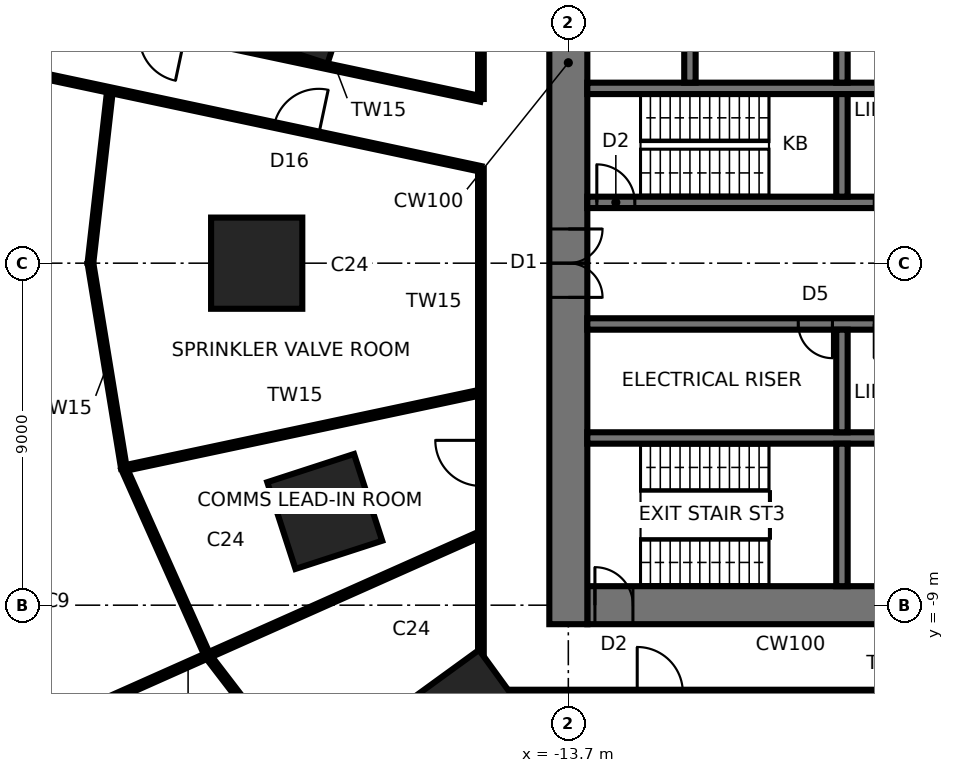
"""IFC4 building model, lengths in metres.
Left out: names, types, materials, properties, quantities, classifications, styles, units other than length and angle.
Written with IfcOpenShell. Run it as: python <this file> out.ifc"""

import sys

from ifc_helpers import new_model, si_unit, direction, frame, frame_2d, origin, origin_2d, place, context, subcontext, project, spatial, rectangle, extrude, element, fill, save


model = new_model("IFC4")
c1 = context("Model", 3, precision=1e-05, world=origin(), true_north=direction((0.0, 1.0)))
c2 = subcontext(c1, "Body", "Model", "MODEL_VIEW")
j1 = project(units=[si_unit("LENGTHUNIT", "METRE"), si_unit("PLANEANGLEUNIT", "RADIAN")], contexts=[c1])
p1 = place(None, origin())
s1 = spatial("IfcSite", under=j1, at=p1, CompositionType="ELEMENT")
p2 = place(p1, origin())
s2 = spatial("IfcBuilding", under=s1, at=p2, CompositionType="ELEMENT")
p3 = place(p2, frame((0.0, 0.0, -5.0)))
s3 = spatial("IfcBuildingStorey", under=s2, at=p3, CompositionType="ELEMENT", Elevation=-5.0)
for number, where, z_axis, x_axis in (
    (1, (-20.808, 6.761, -0.15), (0.0, 0.0, 1.0), (-0.951, 0.309, 0.0)),
    (2, (-21.9, 0.0, -0.15), (0.0, 0.0, 1.0), (-1.0, 0.0, 0.0)),
    (3, (-20.109, -6.534, -0.15), (0.0, 0.0, 1.0), (-0.951, -0.309, 0.0)),
    (4, (-16.315, -11.854, -0.15), (0.0, 0.0, 1.0), (-0.809, -0.588, 0.0)),
):
    element("IfcColumn", number, at=place(p3, frame(where, z_axis=z_axis, x_axis=x_axis)), inside=s3, PredefinedType="COLUMN", context=c2, shape_type="SweptSolid", body=[
        extrude(rectangle(XDim=2.4, YDim=2.4, at=origin_2d()), origin(), (0.0, 0.0, 1.0), 5.15),
    ])
p4 = place(p3, frame((-13.2, -9.0, -0.15), z_axis=(0.0, 0.0, 1.0), x_axis=(1.0, 0.0, 0.0)))
e5 = element("IfcWall", 5, at=p4, inside=s3, PredefinedType="SHEAR", context=c2, shape_type="SweptSolid", body=[
    extrude(rectangle(XDim=26.4, YDim=1.0, at=frame_2d((13.2, 0.0))), origin(), (0.0, 0.0, 1.0), 5.15),
])
p5 = place(p4, frame((0.2, 0.0, 0.15)))
e6 = element("IfcOpeningElement", 6, at=p5, cuts=e5, PredefinedType="OPENING", context=c2, shape_type="SweptSolid", body=[
    extrude(rectangle(XDim=1.0, YDim=2.1, at=frame_2d((0.5, 1.05))), frame((0.0, 0.51, 0.0), z_axis=(0.0, -1.0, 0.0), x_axis=(1.0, 0.0, 0.0)), (0.0, 0.0, 1.0), 1.02),
])
p6 = place(p4, frame((9.5, 0.0, 0.15)))
e7 = element("IfcOpeningElement", 7, at=p6, cuts=e5, PredefinedType="OPENING", context=c2, shape_type="SweptSolid", body=[
    extrude(rectangle(XDim=0.9, YDim=2.1, at=frame_2d((0.45, 1.05))), frame((0.0, 0.51, 0.0), z_axis=(0.0, -1.0, 0.0), x_axis=(1.0, 0.0, 0.0)), (0.0, 0.0, 1.0), 1.02),
])
p7 = place(p4, frame((16.0, 0.0, 0.15)))
e8 = element("IfcOpeningElement", 8, at=p7, cuts=e5, PredefinedType="OPENING", context=c2, shape_type="SweptSolid", body=[
    extrude(rectangle(XDim=0.9, YDim=2.1, at=frame_2d((0.45, 1.05))), frame((0.0, 0.51, 0.0), z_axis=(0.0, -1.0, 0.0), x_axis=(1.0, 0.0, 0.0)), (0.0, 0.0, 1.0), 1.02),
])
p8 = place(p4, frame((22.85, 0.0, 0.15)))
e9 = element("IfcOpeningElement", 9, at=p8, cuts=e5, PredefinedType="OPENING", context=c2, shape_type="SweptSolid", body=[
    extrude(rectangle(XDim=0.9, YDim=2.1, at=frame_2d((0.45, 1.05))), frame((0.0, 0.51, 0.0), z_axis=(0.0, -1.0, 0.0), x_axis=(1.0, 0.0, 0.0)), (0.0, 0.0, 1.0), 1.02),
])
p9 = place(p3, frame((-13.7, 9.5, -0.15), z_axis=(0.0, 0.0, 1.0), x_axis=(0.0, -1.0, 0.0)))
e10 = element("IfcWall", 10, at=p9, inside=s3, PredefinedType="SHEAR", context=c2, shape_type="SweptSolid", body=[
    extrude(rectangle(XDim=19.0, YDim=1.0, at=frame_2d((9.5, 0.0))), origin(), (0.0, 0.0, 1.0), 5.15),
])
p10 = place(p9, frame((8.6, 0.0, 0.15)))
e11 = element("IfcOpeningElement", 11, at=p10, cuts=e10, PredefinedType="OPENING", context=c2, shape_type="SweptSolid", body=[
    extrude(rectangle(XDim=1.8, YDim=2.4, at=frame_2d((0.9, 1.2))), frame((0.0, 0.51, 0.0), z_axis=(0.0, -1.0, 0.0), x_axis=(1.0, 0.0, 0.0)), (0.0, 0.0, 1.0), 1.02),
])
p11 = place(p3, frame((-13.2, 1.6, -0.15), z_axis=(0.0, 0.0, 1.0), x_axis=(1.0, 0.0, 0.0)))
e12 = element("IfcWall", 12, at=p11, inside=s3, PredefinedType="SHEAR", context=c2, shape_type="SweptSolid", body=[
    extrude(rectangle(XDim=26.4, YDim=0.3, at=frame_2d((13.2, 0.0))), origin(), (0.0, 0.0, 1.0), 5.15),
])
p12 = place(p11, frame((0.25, 0.0, 0.15)))
e13 = element("IfcOpeningElement", 13, at=p12, cuts=e12, PredefinedType="OPENING", context=c2, shape_type="SweptSolid", body=[
    extrude(rectangle(XDim=1.0, YDim=2.1, at=frame_2d((0.5, 1.05))), frame((0.0, 0.16, 0.0), z_axis=(0.0, -1.0, 0.0), x_axis=(1.0, 0.0, 0.0)), (0.0, 0.0, 1.0), 0.32),
])
p13 = place(p11, frame((20.25, 0.0, 0.15)))
e14 = element("IfcOpeningElement", 14, at=p13, cuts=e12, PredefinedType="OPENING", context=c2, shape_type="SweptSolid", body=[
    extrude(rectangle(XDim=1.5, YDim=2.4, at=frame_2d((0.75, 1.2))), frame((0.0, 0.16, 0.0), z_axis=(0.0, -1.0, 0.0), x_axis=(1.0, 0.0, 0.0)), (0.0, 0.0, 1.0), 0.32),
])
p14 = place(p11, frame((7.55, 0.0, 0.15)))
e15 = element("IfcOpeningElement", 15, at=p14, cuts=e12, PredefinedType="OPENING", context=c2, shape_type="SweptSolid", body=[
    extrude(rectangle(XDim=0.9, YDim=2.1, at=frame_2d((0.45, 1.05))), frame((0.0, 0.16, 0.0), z_axis=(0.0, -1.0, 0.0), x_axis=(1.0, 0.0, 0.0)), (0.0, 0.0, 1.0), 0.32),
])
p15 = place(p11, frame((10.15, 0.0, 0.15)))
e16 = element("IfcOpeningElement", 16, at=p15, cuts=e12, PredefinedType="OPENING", context=c2, shape_type="SweptSolid", body=[
    extrude(rectangle(XDim=0.9, YDim=2.1, at=frame_2d((0.45, 1.05))), frame((0.0, 0.16, 0.0), z_axis=(0.0, -1.0, 0.0), x_axis=(1.0, 0.0, 0.0)), (0.0, 0.0, 1.0), 0.32),
])
p16 = place(p11, frame((12.75, 0.0, 0.15)))
e17 = element("IfcOpeningElement", 17, at=p16, cuts=e12, PredefinedType="OPENING", context=c2, shape_type="SweptSolid", body=[
    extrude(rectangle(XDim=0.9, YDim=2.1, at=frame_2d((0.45, 1.05))), frame((0.0, 0.16, 0.0), z_axis=(0.0, -1.0, 0.0), x_axis=(1.0, 0.0, 0.0)), (0.0, 0.0, 1.0), 0.32),
])
p17 = place(p11, frame((15.35, 0.0, 0.15)))
e18 = element("IfcOpeningElement", 18, at=p17, cuts=e12, PredefinedType="OPENING", context=c2, shape_type="SweptSolid", body=[
    extrude(rectangle(XDim=0.9, YDim=2.1, at=frame_2d((0.45, 1.05))), frame((0.0, 0.16, 0.0), z_axis=(0.0, -1.0, 0.0), x_axis=(1.0, 0.0, 0.0)), (0.0, 0.0, 1.0), 0.32),
])
p18 = place(p11, frame((17.95, 0.0, 0.15)))
e19 = element("IfcOpeningElement", 19, at=p18, cuts=e12, PredefinedType="OPENING", context=c2, shape_type="SweptSolid", body=[
    extrude(rectangle(XDim=0.9, YDim=2.1, at=frame_2d((0.45, 1.05))), frame((0.0, 0.16, 0.0), z_axis=(0.0, -1.0, 0.0), x_axis=(1.0, 0.0, 0.0)), (0.0, 0.0, 1.0), 0.32),
])
p19 = place(p11, frame((24.15, 0.0, 0.15)))
e20 = element("IfcOpeningElement", 20, at=p19, cuts=e12, PredefinedType="OPENING", context=c2, shape_type="SweptSolid", body=[
    extrude(rectangle(XDim=0.9, YDim=2.1, at=frame_2d((0.45, 1.05))), frame((0.0, 0.16, 0.0), z_axis=(0.0, -1.0, 0.0), x_axis=(1.0, 0.0, 0.0)), (0.0, 0.0, 1.0), 0.32),
])
p20 = place(p3, frame((-13.2, -1.6, -0.15), z_axis=(0.0, 0.0, 1.0), x_axis=(1.0, 0.0, 0.0)))
e21 = element("IfcWall", 21, at=p20, inside=s3, PredefinedType="SHEAR", context=c2, shape_type="SweptSolid", body=[
    extrude(rectangle(XDim=26.4, YDim=0.3, at=frame_2d((13.2, 0.0))), origin(), (0.0, 0.0, 1.0), 5.15),
])
p21 = place(p20, frame((25.15, 0.0, 0.15)))
e22 = element("IfcOpeningElement", 22, at=p21, cuts=e21, PredefinedType="OPENING", context=c2, shape_type="SweptSolid", body=[
    extrude(rectangle(XDim=1.0, YDim=2.1, at=frame_2d((0.5, 1.05))), frame((0.0, 0.16, 0.0), z_axis=(0.0, -1.0, 0.0), x_axis=(1.0, 0.0, 0.0)), (0.0, 0.0, 1.0), 0.32),
])
p22 = place(p20, frame((7.55, 0.0, 0.15)))
e23 = element("IfcOpeningElement", 23, at=p22, cuts=e21, PredefinedType="OPENING", context=c2, shape_type="SweptSolid", body=[
    extrude(rectangle(XDim=0.9, YDim=2.1, at=frame_2d((0.45, 1.05))), frame((0.0, 0.16, 0.0), z_axis=(0.0, -1.0, 0.0), x_axis=(1.0, 0.0, 0.0)), (0.0, 0.0, 1.0), 0.32),
])
p23 = place(p20, frame((10.15, 0.0, 0.15)))
e24 = element("IfcOpeningElement", 24, at=p23, cuts=e21, PredefinedType="OPENING", context=c2, shape_type="SweptSolid", body=[
    extrude(rectangle(XDim=0.9, YDim=2.1, at=frame_2d((0.45, 1.05))), frame((0.0, 0.16, 0.0), z_axis=(0.0, -1.0, 0.0), x_axis=(1.0, 0.0, 0.0)), (0.0, 0.0, 1.0), 0.32),
])
p24 = place(p20, frame((12.75, 0.0, 0.15)))
e25 = element("IfcOpeningElement", 25, at=p24, cuts=e21, PredefinedType="OPENING", context=c2, shape_type="SweptSolid", body=[
    extrude(rectangle(XDim=0.9, YDim=2.1, at=frame_2d((0.45, 1.05))), frame((0.0, 0.16, 0.0), z_axis=(0.0, -1.0, 0.0), x_axis=(1.0, 0.0, 0.0)), (0.0, 0.0, 1.0), 0.32),
])
p25 = place(p20, frame((15.25, 0.0, 0.15)))
e26 = element("IfcOpeningElement", 26, at=p25, cuts=e21, PredefinedType="OPENING", context=c2, shape_type="SweptSolid", body=[
    extrude(rectangle(XDim=1.1, YDim=2.3, at=frame_2d((0.55, 1.15))), frame((0.0, 0.16, 0.0), z_axis=(0.0, -1.0, 0.0), x_axis=(1.0, 0.0, 0.0)), (0.0, 0.0, 1.0), 0.32),
])
p26 = place(p20, frame((17.85, 0.0, 0.15)))
e27 = element("IfcOpeningElement", 27, at=p26, cuts=e21, PredefinedType="OPENING", context=c2, shape_type="SweptSolid", body=[
    extrude(rectangle(XDim=1.1, YDim=2.3, at=frame_2d((0.55, 1.15))), frame((0.0, 0.16, 0.0), z_axis=(0.0, -1.0, 0.0), x_axis=(1.0, 0.0, 0.0)), (0.0, 0.0, 1.0), 0.32),
])
p27 = place(p20, frame((5.55, 0.0, 0.15)))
e28 = element("IfcOpeningElement", 28, at=p27, cuts=e21, PredefinedType="OPENING", context=c2, shape_type="SweptSolid", body=[
    extrude(rectangle(XDim=0.9, YDim=2.1, at=frame_2d((0.45, 1.05))), frame((0.0, 0.16, 0.0), z_axis=(0.0, -1.0, 0.0), x_axis=(1.0, 0.0, 0.0)), (0.0, 0.0, 1.0), 0.32),
])
for number, where, z_axis, x_axis in (
    (29, (-13.2, 4.6, -0.15), (0.0, 0.0, 1.0), (1.0, 0.0, 0.0)),
    (30, (-13.2, -4.6, -0.15), (0.0, 0.0, 1.0), (1.0, 0.0, 0.0)),
):
    element("IfcWall", number, at=place(p3, frame(where, z_axis=z_axis, x_axis=x_axis)), inside=s3, PredefinedType="SHEAR", context=c2, shape_type="SweptSolid", body=[
        extrude(rectangle(XDim=26.4, YDim=0.3, at=frame_2d((13.2, 0.0))), origin(), (0.0, 0.0, 1.0), 5.15),
    ])
p28 = place(p3, frame((-6.5, 1.75, -0.15), z_axis=(0.0, 0.0, 1.0), x_axis=(0.0, 1.0, 0.0)))
e31 = element("IfcWall", 31, at=p28, inside=s3, PredefinedType="SHEAR", context=c2, shape_type="SweptSolid", body=[
    extrude(rectangle(XDim=2.7, YDim=0.3, at=frame_2d((1.35, 0.0))), origin(), (0.0, 0.0, 1.0), 5.15),
])
p29 = place(p3, frame((-6.5, 4.75, -0.15), z_axis=(0.0, 0.0, 1.0), x_axis=(0.0, 1.0, 0.0)))
e32 = element("IfcWall", 32, at=p29, inside=s3, PredefinedType="SHEAR", context=c2, shape_type="SweptSolid", body=[
    extrude(rectangle(XDim=3.75, YDim=0.3, at=frame_2d((1.875, 0.0))), origin(), (0.0, 0.0, 1.0), 5.15),
])
p30 = place(p3, frame((-6.5, -1.75, -0.15), z_axis=(0.0, 0.0, 1.0), x_axis=(0.0, -1.0, 0.0)))
e33 = element("IfcWall", 33, at=p30, inside=s3, PredefinedType="SHEAR", context=c2, shape_type="SweptSolid", body=[
    extrude(rectangle(XDim=2.7, YDim=0.3, at=frame_2d((1.35, 0.0))), origin(), (0.0, 0.0, 1.0), 5.15),
])
for number, where, z_axis, x_axis in (
    (34, (-6.5, -4.75, -0.15), (0.0, 0.0, 1.0), (0.0, -1.0, 0.0)),
    (35, (-10.5, 4.75, -0.15), (0.0, 0.0, 1.0), (0.0, 1.0, 0.0)),
):
    element("IfcWall", number, at=place(p3, frame(where, z_axis=z_axis, x_axis=x_axis)), inside=s3, PredefinedType="SHEAR", context=c2, shape_type="SweptSolid", body=[
        extrude(rectangle(XDim=3.75, YDim=0.3, at=frame_2d((1.875, 0.0))), origin(), (0.0, 0.0, 1.0), 5.15),
    ])
p31 = place(p3, frame((-25.393, -5.397, 0.0), z_axis=(0.0, 0.0, 1.0), x_axis=(-0.161241932964, 0.986914909733, 0.0)))
e36 = element("IfcWall", 36, at=p31, inside=s3, PredefinedType="PARTITIONING", context=c2, shape_type="SweptSolid", body=[
    extrude(rectangle(XDim=5.469, YDim=0.15, at=frame_2d((2.734, 0.0))), origin(), (0.0, 0.0, 1.0), 4.8),
])
p32 = place(p3, frame((-16.0, -3.401, 0.0), z_axis=(0.0, 0.0, 1.0), x_axis=(-0.978147089661, -0.207914095214, 0.0)))
e37 = element("IfcWall", 37, at=p32, inside=s3, PredefinedType="PARTITIONING", context=c2, shape_type="SweptSolid", body=[
    extrude(rectangle(XDim=9.603, YDim=0.15, at=frame_2d((4.802, 0.0))), origin(), (0.0, 0.0, 1.0), 4.8),
])
p33 = place(p3, frame((-16.0, 2.481, 0.0), z_axis=(0.0, 0.0, 1.0), x_axis=(0.0, -1.0, 0.0)))
e38 = element("IfcWall", 38, at=p33, inside=s3, PredefinedType="PARTITIONING", context=c2, shape_type="SweptSolid", body=[
    extrude(rectangle(XDim=13.781, YDim=0.15, at=frame_2d((6.89, 0.0))), origin(), (0.0, 0.0, 1.0), 4.8),
])
p34 = place(p33, frame((7.143, 0.0, 0.0)))
e39 = element("IfcOpeningElement", 39, at=p34, cuts=e38, PredefinedType="OPENING", context=c2, shape_type="SweptSolid", body=[
    extrude(rectangle(XDim=1.2, YDim=2.1, at=frame_2d((0.6, 1.05))), frame((0.0, 0.085, 0.0), z_axis=(0.0, -1.0, 0.0), x_axis=(1.0, 0.0, 0.0)), (0.0, 0.0, 1.0), 0.17),
])
p35 = place(p3, frame((-23.193, -10.326, 0.0), z_axis=(0.0, 0.0, 1.0), x_axis=(-0.40763198254, 0.91314630088, 0.0)))
e40 = element("IfcWall", 40, at=p35, inside=s3, PredefinedType="PARTITIONING", context=c2, shape_type="SweptSolid", body=[
    extrude(rectangle(XDim=5.397, YDim=0.15, at=frame_2d((2.699, 0.0))), origin(), (0.0, 0.0, 1.0), 4.8),
])
p36 = place(p3, frame((-16.0, -7.124, 0.0), z_axis=(0.0, 0.0, 1.0), x_axis=(-0.913549946031, -0.40672656184, 0.0)))
e41 = element("IfcWall", 41, at=p36, inside=s3, PredefinedType="PARTITIONING", context=c2, shape_type="SweptSolid", body=[
    extrude(rectangle(XDim=16.868, YDim=0.15, at=frame_2d((8.434, 0.0))), origin(), (0.0, 0.0, 1.0), 4.8),
])
p37 = place(p3, frame((-19.98, -14.516, 0.0), z_axis=(0.0, 0.0, 1.0), x_axis=(-0.608481047622, 0.793568405801, 0.0)))
e42 = element("IfcWall", 42, at=p37, inside=s3, PredefinedType="PARTITIONING", context=c2, shape_type="SweptSolid", body=[
    extrude(rectangle(XDim=5.28, YDim=0.15, at=frame_2d((2.64, 0.0))), origin(), (0.0, 0.0, 1.0), 4.8),
])
p38 = place(p3, frame((-16.0, -11.3, 0.0), z_axis=(0.0, 0.0, 1.0), x_axis=(1.0, 0.0, 0.0)))
e43 = element("IfcWall", 43, at=p38, inside=s3, PredefinedType="PARTITIONING", context=c2, shape_type="SweptSolid", body=[
    extrude(rectangle(XDim=16.283, YDim=0.15, at=frame_2d((8.141, 0.0))), origin(), (0.0, 0.0, 1.0), 4.8),
])
p39 = place(p38, frame((4.113, 0.0, 0.0)))
e44 = element("IfcOpeningElement", 44, at=p39, cuts=e43, PredefinedType="OPENING", context=c2, shape_type="SweptSolid", body=[
    extrude(rectangle(XDim=1.2, YDim=2.4, at=frame_2d((0.6, 1.2))), frame((0.0, 0.085, 0.0), z_axis=(0.0, -1.0, 0.0), x_axis=(1.0, 0.0, 0.0)), (0.0, 0.0, 1.0), 0.17),
])
p40 = place(p3, frame((-6.524, -11.3, 0.0), z_axis=(0.0, 0.0, 1.0), x_axis=(-0.499999933838, -0.866025441983, 0.0)))
e45 = element("IfcWall", 45, at=p40, inside=s3, PredefinedType="PARTITIONING", context=c2, shape_type="SweptSolid", body=[
    extrude(rectangle(XDim=18.533, YDim=0.15, at=frame_2d((9.266, 0.0))), origin(), (0.0, 0.0, 1.0), 4.8),
])
p41 = place(p3, frame((-16.0, 11.3, 0.0), z_axis=(0.0, 0.0, 1.0), x_axis=(0.0, -1.0, 0.0)))
e46 = element("IfcWall", 46, at=p41, inside=s3, PredefinedType="PARTITIONING", context=c2, shape_type="SweptSolid", body=[
    extrude(rectangle(XDim=6.979, YDim=0.15, at=frame_2d((3.49, 0.0))), origin(), (0.0, 0.0, 1.0), 4.8),
])
p42 = place(p3, frame((-16.0, 4.321, 0.0), z_axis=(0.0, 0.0, 1.0), x_axis=(-0.978148024242, 0.207909698358, 0.0)))
e47 = element("IfcWall", 47, at=p42, inside=s3, PredefinedType="PARTITIONING", context=c2, shape_type="SweptSolid", body=[
    extrude(rectangle(XDim=18.227, YDim=0.15, at=frame_2d((9.113, 0.0))), origin(), (0.0, 0.0, 1.0), 4.8),
])
p43 = place(p42, frame((7.963, 0.0, 0.0)))
e48 = element("IfcOpeningElement", 48, at=p43, cuts=e47, PredefinedType="OPENING", context=c2, shape_type="SweptSolid", body=[
    extrude(rectangle(XDim=1.2, YDim=2.1, at=frame_2d((0.6, 1.05))), frame((0.0, 0.085, 0.0), z_axis=(0.0, -1.0, 0.0), x_axis=(1.0, 0.0, 0.0)), (0.0, 0.0, 1.0), 0.17),
])
p44 = place(p42, frame((12.972, 0.0, 0.0)))
e49 = element("IfcOpeningElement", 49, at=p44, cuts=e47, PredefinedType="OPENING", context=c2, shape_type="SweptSolid", body=[
    extrude(rectangle(XDim=1.8, YDim=2.4, at=frame_2d((0.9, 1.2))), frame((0.0, 0.085, 0.0), z_axis=(0.0, -1.0, 0.0), x_axis=(1.0, 0.0, 0.0)), (0.0, 0.0, 1.0), 0.17),
])
p45 = place(p3, frame((-34.296, 6.37, 0.0), z_axis=(0.0, 0.0, 1.0), x_axis=(0.978147006591, -0.207914486022, 0.0)))
e50 = element("IfcWall", 50, at=p45, inside=s3, PredefinedType="PARTITIONING", context=c2, shape_type="SweptSolid", body=[
    extrude(rectangle(XDim=18.704, YDim=0.15, at=frame_2d((9.352, 0.0))), origin(), (0.0, 0.0, 1.0), 4.8),
])
p46 = place(p45, frame((13.141, 0.0, 0.0)))
e51 = element("IfcOpeningElement", 51, at=p46, cuts=e50, PredefinedType="OPENING", context=c2, shape_type="SweptSolid", body=[
    extrude(rectangle(XDim=1.2, YDim=2.1, at=frame_2d((0.6, 1.05))), frame((0.0, 0.085, 0.0), z_axis=(0.0, -1.0, 0.0), x_axis=(1.0, 0.0, 0.0)), (0.0, 0.0, 1.0), 0.17),
])
p47 = place(p3, frame((-26.275, 0.0, 0.0), z_axis=(0.0, 0.0, 1.0), x_axis=(0.112634852962, 0.993636447549, 0.0)))
e52 = element("IfcWall", 52, at=p47, inside=s3, PredefinedType="PARTITIONING", context=c2, shape_type="SweptSolid", body=[
    extrude(rectangle(XDim=4.584, YDim=0.15, at=frame_2d((2.292, 0.0))), origin(), (0.0, 0.0, 1.0), 4.8),
])
p48 = place(p10, origin())
e53 = element("IfcDoor", 53, at=p48, inside=s3, OperationType="DOUBLE_DOOR_SINGLE_SWING", PredefinedType="DOOR", context=c2, shape_type="SweptSolid", body=[
    extrude(rectangle(XDim=1.72, YDim=2.36, at=frame_2d((0.9, 1.18))), frame((0.0, 0.025, 0.0), z_axis=(0.0, -1.0, 0.0), x_axis=(1.0, 0.0, 0.0)), (0.0, 0.0, 1.0), 0.05),
    extrude(rectangle(XDim=0.04, YDim=2.4, at=frame_2d((0.02, 1.2))), frame((0.0, 0.25, 0.0), z_axis=(0.0, -1.0, 0.0), x_axis=(1.0, 0.0, 0.0)), (0.0, 0.0, 1.0), 0.5),
    extrude(rectangle(XDim=0.04, YDim=2.4, at=frame_2d((1.78, 1.2))), frame((0.0, 0.25, 0.0), z_axis=(0.0, -1.0, 0.0), x_axis=(1.0, 0.0, 0.0)), (0.0, 0.0, 1.0), 0.5),
    extrude(rectangle(XDim=1.72, YDim=0.04, at=frame_2d((0.9, 2.38))), frame((0.0, 0.25, 0.0), z_axis=(0.0, -1.0, 0.0), x_axis=(1.0, 0.0, 0.0)), (0.0, 0.0, 1.0), 0.5),
])
fill(e11, e53)
p49 = place(p12, origin())
e54 = element("IfcDoor", 54, at=p49, inside=s3, OperationType="SINGLE_SWING_LEFT", PredefinedType="DOOR", context=c2, shape_type="SweptSolid", body=[
    extrude(rectangle(XDim=1.0, YDim=2.1, at=frame_2d((0.5, 1.05))), frame((0.0, 0.025, 0.0), z_axis=(0.0, -1.0, 0.0), x_axis=(1.0, 0.0, 0.0)), (0.0, 0.0, 1.0), 0.05),
])
fill(e13, e54)
p50 = place(p5, origin())
e55 = element("IfcDoor", 55, at=p50, inside=s3, OperationType="SINGLE_SWING_LEFT", PredefinedType="DOOR", context=c2, shape_type="SweptSolid", body=[
    extrude(rectangle(XDim=0.92, YDim=2.06, at=frame_2d((0.5, 1.03))), frame((0.0, 0.025, 0.0), z_axis=(0.0, -1.0, 0.0), x_axis=(1.0, 0.0, 0.0)), (0.0, 0.0, 1.0), 0.05),
    extrude(rectangle(XDim=0.04, YDim=2.1, at=frame_2d((0.02, 1.05))), frame((0.0, 0.25, 0.0), z_axis=(0.0, -1.0, 0.0), x_axis=(1.0, 0.0, 0.0)), (0.0, 0.0, 1.0), 0.5),
    extrude(rectangle(XDim=0.04, YDim=2.1, at=frame_2d((0.98, 1.05))), frame((0.0, 0.25, 0.0), z_axis=(0.0, -1.0, 0.0), x_axis=(1.0, 0.0, 0.0)), (0.0, 0.0, 1.0), 0.5),
    extrude(rectangle(XDim=0.92, YDim=0.04, at=frame_2d((0.5, 2.08))), frame((0.0, 0.25, 0.0), z_axis=(0.0, -1.0, 0.0), x_axis=(1.0, 0.0, 0.0)), (0.0, 0.0, 1.0), 0.5),
])
fill(e6, e55)
p51 = place(p27, frame((0.9, 0.0, 0.0), z_axis=(0.0, 0.0, 1.0), x_axis=(-1.0, 0.0, 0.0)))
e56 = element("IfcDoor", 56, at=p51, inside=s3, OperationType="SINGLE_SWING_LEFT", PredefinedType="DOOR", context=c2, shape_type="SweptSolid", body=[
    extrude(rectangle(XDim=0.9, YDim=2.1, at=frame_2d((0.45, 1.05))), frame((0.0, 0.025, 0.0), z_axis=(0.0, -1.0, 0.0), x_axis=(1.0, 0.0, 0.0)), (0.0, 0.0, 1.0), 0.05),
])
fill(e28, e56)
p52 = place(p46, origin())
e57 = element("IfcDoor", 57, at=p52, inside=s3, OperationType="SINGLE_SWING_RIGHT", PredefinedType="DOOR", context=c2, shape_type="SweptSolid", body=[
    extrude(rectangle(XDim=1.2, YDim=2.1, at=frame_2d((0.6, 1.05))), frame((0.0, 0.025, 0.0), z_axis=(0.0, -1.0, 0.0), x_axis=(1.0, 0.0, 0.0)), (0.0, 0.0, 1.0), 0.05),
])
fill(e51, e57)
p53 = place(p34, frame((1.2, 0.0, 0.0), z_axis=(0.0, 0.0, 1.0), x_axis=(-1.0, 0.0, 0.0)))
e58 = element("IfcDoor", 58, at=p53, inside=s3, OperationType="SINGLE_SWING_RIGHT", PredefinedType="DOOR", context=c2, shape_type="SweptSolid", body=[
    extrude(rectangle(XDim=1.2, YDim=2.1, at=frame_2d((0.6, 1.05))), frame((0.0, 0.025, 0.0), z_axis=(0.0, -1.0, 0.0), x_axis=(1.0, 0.0, 0.0)), (0.0, 0.0, 1.0), 0.05),
])
fill(e39, e58)
p54 = place(p39, origin())
e59 = element("IfcDoor", 59, at=p54, inside=s3, OperationType="SINGLE_SWING_LEFT", PredefinedType="DOOR", context=c2, shape_type="SweptSolid", body=[
    extrude(rectangle(XDim=1.2, YDim=2.4, at=frame_2d((0.6, 1.2))), frame((0.0, 0.025, 0.0), z_axis=(0.0, -1.0, 0.0), x_axis=(1.0, 0.0, 0.0)), (0.0, 0.0, 1.0), 0.05),
])
fill(e44, e59)
save(model, sys.argv[1])
